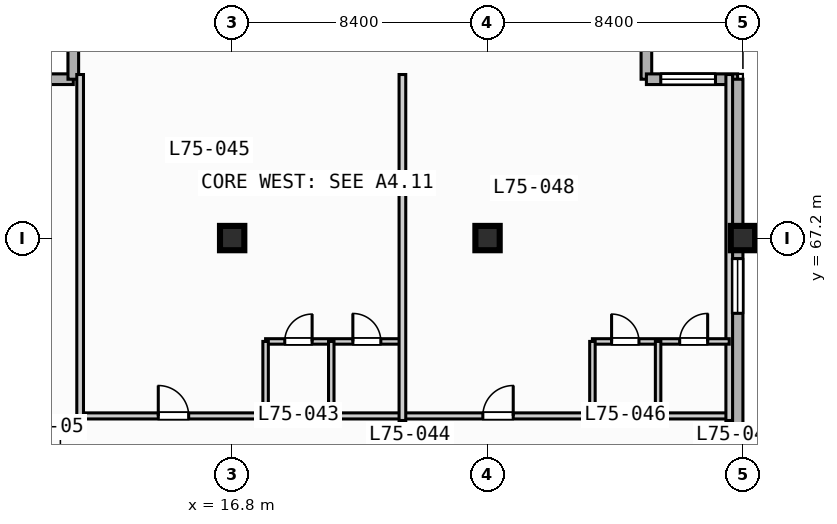
"""IFC4 building model, lengths in metres.
Left out: names, types, materials, properties, quantities, classifications, styles, units other than length and angle.
Written with IfcOpenShell. Run it as: python <this file> out.ifc"""

import sys

from ifc_helpers import new_model, si_unit, direction, frame, frame_2d, origin, origin_2d, place, context, subcontext, project, spatial, rectangle, extrude, element, fill, save


model = new_model("IFC4")
c1 = context("Model", 3, precision=1e-05, world=origin(), true_north=direction((0.0, 1.0)))
c2 = subcontext(c1, "Body", "Model", "MODEL_VIEW")
j1 = project(units=[si_unit("LENGTHUNIT", "METRE"), si_unit("PLANEANGLEUNIT", "RADIAN")], contexts=[c1])
p1 = place(None, origin())
s1 = spatial("IfcSite", under=j1, at=p1, CompositionType="ELEMENT")
p2 = place(p1, origin())
s2 = spatial("IfcBuilding", under=s1, at=p2, CompositionType="ELEMENT")
p3 = place(p2, frame((0.0, 0.0, 304.7)))
s3 = spatial("IfcBuildingStorey", under=s2, at=p3, CompositionType="ELEMENT", Elevation=304.7)
for number, where, z_axis, x_axis in (
    (1, (16.8, 67.2, 0.0), (0.0, 0.0, 1.0), (1.0, 0.0, 0.0)),
    (2, (25.2, 67.2, 0.0), (0.0, 0.0, 1.0), (1.0, 0.0, 0.0)),
    (3, (33.6, 67.2, 0.0), (0.0, 0.0, 1.0), (1.0, 0.0, 0.0)),
):
    element("IfcColumn", number, at=place(p3, frame(where, z_axis=z_axis, x_axis=x_axis)), inside=s3, PredefinedType="COLUMN", context=c2, shape_type="SweptSolid", body=[
        extrude(rectangle(XDim=0.8, YDim=0.8, at=origin_2d()), origin(), (0.0, 0.0, 1.0), 3.9),
    ])
for number, where, z_axis, x_axis in (
    (4, (8.575, 72.425, 0.0), (0.0, 0.0, 1.0), (1.0, 0.0, 0.0)),
    (5, (11.575, 72.425, 0.0), (0.0, 0.0, 1.0), (0.0, 1.0, 0.0)),
    (6, (30.425, 75.425, 0.0), (0.0, 0.0, 1.0), (0.0, -1.0, 0.0)),
):
    element("IfcWall", number, at=place(p3, frame(where, z_axis=z_axis, x_axis=x_axis)), inside=s3, PredefinedType="STANDARD", context=c2, shape_type="SweptSolid", body=[
        extrude(rectangle(XDim=3.0, YDim=0.35, at=frame_2d((1.5, 0.0))), origin(), (0.0, 0.0, 1.0), 3.67),
    ])
p4 = place(p3, frame((30.425, 72.425, 0.0), z_axis=(0.0, 0.0, 1.0), x_axis=(1.0, 0.0, 0.0)))
e7 = element("IfcWall", 7, at=p4, inside=s3, PredefinedType="STANDARD", context=c2, shape_type="SweptSolid", body=[
    extrude(rectangle(XDim=3.0, YDim=0.35, at=frame_2d((1.5, 0.0))), origin(), (0.0, 0.0, 1.0), 3.67),
])
p5 = place(p4, frame((0.472, 0.0, 0.85)))
e8 = element("IfcOpeningElement", 8, at=p5, cuts=e7, PredefinedType="OPENING", context=c2, shape_type="SweptSolid", body=[
    extrude(rectangle(XDim=1.8, YDim=1.8, at=frame_2d((0.9, 0.9))), frame((0.0, 0.185, 0.0), z_axis=(0.0, -1.0, 0.0), x_axis=(1.0, 0.0, 0.0)), (0.0, 0.0, 1.0), 0.37),
])
p6 = place(p3, frame((33.425, 72.425, 0.0), z_axis=(0.0, 0.0, 1.0), x_axis=(0.0, -1.0, 0.0)))
e9 = element("IfcWall", 9, at=p6, inside=s3, PredefinedType="STANDARD", context=c2, shape_type="SweptSolid", body=[
    extrude(rectangle(XDim=39.0, YDim=0.35, at=frame_2d((19.5, 0.0))), origin(), (0.0, 0.0, 1.0), 3.67),
])
p7 = place(p6, frame((5.9, 0.0, 0.85)))
e10 = element("IfcOpeningElement", 10, at=p7, cuts=e9, PredefinedType="OPENING", context=c2, shape_type="SweptSolid", body=[
    extrude(rectangle(XDim=1.8, YDim=1.8, at=frame_2d((0.9, 0.9))), frame((0.0, 0.185, 0.0), z_axis=(0.0, -1.0, 0.0), x_axis=(1.0, 0.0, 0.0)), (0.0, 0.0, 1.0), 0.37),
])
p8 = place(p3, frame((11.8, 61.35, 0.0), z_axis=(0.0, 0.0, 1.0), x_axis=(1.0, 0.0, 0.0)))
e11 = element("IfcWall", 11, at=p8, inside=s3, PredefinedType="PARTITIONING", context=c2, shape_type="SweptSolid", body=[
    extrude(rectangle(XDim=21.35, YDim=0.2, at=frame_2d((10.675, 0.0))), origin(), (0.0, 0.0, 1.0), 3.67),
])
p9 = place(p8, frame((2.57, 0.0, 0.0)))
e12 = element("IfcOpeningElement", 12, at=p9, cuts=e11, PredefinedType="OPENING", context=c2, shape_type="SweptSolid", body=[
    extrude(rectangle(XDim=1.0, YDim=2.15, at=frame_2d((0.5, 1.075))), frame((0.0, 0.11, 0.0), z_axis=(0.0, -1.0, 0.0), x_axis=(1.0, 0.0, 0.0)), (0.0, 0.0, 1.0), 0.22),
])
p10 = place(p8, frame((13.245, 0.0, 0.0)))
e13 = element("IfcOpeningElement", 13, at=p10, cuts=e11, PredefinedType="OPENING", context=c2, shape_type="SweptSolid", body=[
    extrude(rectangle(XDim=1.0, YDim=2.15, at=frame_2d((0.5, 1.075))), frame((0.0, 0.11, 0.0), z_axis=(0.0, -1.0, 0.0), x_axis=(1.0, 0.0, 0.0)), (0.0, 0.0, 1.0), 0.22),
])
p11 = place(p3, frame((11.8, 61.2, 0.0), z_axis=(0.0, 0.0, 1.0), x_axis=(0.0, 1.0, 0.0)))
e14 = element("IfcWall", 14, at=p11, inside=s3, PredefinedType="PARTITIONING", context=c2, shape_type="SweptSolid", body=[
    extrude(rectangle(XDim=11.38, YDim=0.22, at=frame_2d((5.69, 0.0))), origin(), (0.0, 0.0, 1.0), 3.67),
])
p12 = place(p3, frame((17.9, 63.8, 0.0), z_axis=(0.0, 0.0, 1.0), x_axis=(1.0, 0.0, 0.0)))
e15 = element("IfcWall", 15, at=p12, inside=s3, PredefinedType="PLUMBINGWALL", context=c2, shape_type="SweptSolid", body=[
    extrude(rectangle(XDim=4.5, YDim=0.18, at=frame_2d((2.25, 0.0))), origin(), (0.0, 0.0, 1.0), 3.67),
])
p13 = place(p12, frame((0.63, 0.0, 0.0)))
e16 = element("IfcOpeningElement", 16, at=p13, cuts=e15, PredefinedType="OPENING", context=c2, shape_type="SweptSolid", body=[
    extrude(rectangle(XDim=0.9, YDim=2.1, at=frame_2d((0.45, 1.05))), frame((0.0, 0.1, 0.0), z_axis=(0.0, -1.0, 0.0), x_axis=(1.0, 0.0, 0.0)), (0.0, 0.0, 1.0), 0.2),
])
p14 = place(p12, frame((2.87, 0.0, 0.0)))
e17 = element("IfcOpeningElement", 17, at=p14, cuts=e15, PredefinedType="OPENING", context=c2, shape_type="SweptSolid", body=[
    extrude(rectangle(XDim=0.92, YDim=2.1, at=frame_2d((0.46, 1.05))), frame((0.0, 0.1, 0.0), z_axis=(0.0, -1.0, 0.0), x_axis=(1.0, 0.0, 0.0)), (0.0, 0.0, 1.0), 0.2),
])
for number, where, z_axis, x_axis in (
    (18, (17.9, 61.35, 0.0), (0.0, 0.0, 1.0), (0.0, 1.0, 0.0)),
    (19, (20.06, 61.35, 0.0), (0.0, 0.0, 1.0), (0.0, 1.0, 0.0)),
):
    element("IfcWall", number, at=place(p3, frame(where, z_axis=z_axis, x_axis=x_axis)), inside=s3, PredefinedType="PLUMBINGWALL", context=c2, shape_type="SweptSolid", body=[
        extrude(rectangle(XDim=2.45, YDim=0.18, at=frame_2d((1.225, 0.0))), origin(), (0.0, 0.0, 1.0), 3.67),
    ])
for number, where, z_axis, x_axis in (
    (20, (22.4, 61.2, 0.0), (0.0, 0.0, 1.0), (0.0, 1.0, 0.0)),
    (21, (33.15, 61.2, 0.0), (0.0, 0.0, 1.0), (0.0, 1.0, 0.0)),
):
    element("IfcWall", number, at=place(p3, frame(where, z_axis=z_axis, x_axis=x_axis)), inside=s3, PredefinedType="PARTITIONING", context=c2, shape_type="SweptSolid", body=[
        extrude(rectangle(XDim=11.38, YDim=0.22, at=frame_2d((5.69, 0.0))), origin(), (0.0, 0.0, 1.0), 3.67),
    ])
p15 = place(p3, frame((28.65, 63.8, 0.0), z_axis=(0.0, 0.0, 1.0), x_axis=(1.0, 0.0, 0.0)))
e22 = element("IfcWall", 22, at=p15, inside=s3, PredefinedType="PLUMBINGWALL", context=c2, shape_type="SweptSolid", body=[
    extrude(rectangle(XDim=4.5, YDim=0.18, at=frame_2d((2.25, 0.0))), origin(), (0.0, 0.0, 1.0), 3.67),
])
p16 = place(p15, frame((0.63, 0.0, 0.0)))
e23 = element("IfcOpeningElement", 23, at=p16, cuts=e22, PredefinedType="OPENING", context=c2, shape_type="SweptSolid", body=[
    extrude(rectangle(XDim=0.9, YDim=2.1, at=frame_2d((0.45, 1.05))), frame((0.0, 0.1, 0.0), z_axis=(0.0, -1.0, 0.0), x_axis=(1.0, 0.0, 0.0)), (0.0, 0.0, 1.0), 0.2),
])
p17 = place(p15, frame((2.87, 0.0, 0.0)))
e24 = element("IfcOpeningElement", 24, at=p17, cuts=e22, PredefinedType="OPENING", context=c2, shape_type="SweptSolid", body=[
    extrude(rectangle(XDim=0.92, YDim=2.1, at=frame_2d((0.46, 1.05))), frame((0.0, 0.1, 0.0), z_axis=(0.0, -1.0, 0.0), x_axis=(1.0, 0.0, 0.0)), (0.0, 0.0, 1.0), 0.2),
])
for number, where, z_axis, x_axis in (
    (25, (28.65, 61.35, 0.0), (0.0, 0.0, 1.0), (0.0, 1.0, 0.0)),
    (26, (30.81, 61.35, 0.0), (0.0, 0.0, 1.0), (0.0, 1.0, 0.0)),
):
    element("IfcWall", number, at=place(p3, frame(where, z_axis=z_axis, x_axis=x_axis)), inside=s3, PredefinedType="PLUMBINGWALL", context=c2, shape_type="SweptSolid", body=[
        extrude(rectangle(XDim=2.45, YDim=0.18, at=frame_2d((1.225, 0.0))), origin(), (0.0, 0.0, 1.0), 3.67),
    ])
p18 = place(p5, origin())
e27 = element("IfcWindow", 27, at=p18, inside=s3, PartitioningType="SINGLE_PANEL", PredefinedType="WINDOW", context=c2, shape_type="SweptSolid", body=[
    extrude(rectangle(XDim=1.8, YDim=1.8, at=frame_2d((0.9, 0.9))), frame((0.0, 0.03, 0.0), z_axis=(0.0, -1.0, 0.0), x_axis=(1.0, 0.0, 0.0)), (0.0, 0.0, 1.0), 0.06),
])
fill(e8, e27)
p19 = place(p7, origin())
e28 = element("IfcWindow", 28, at=p19, inside=s3, PartitioningType="SINGLE_PANEL", PredefinedType="WINDOW", context=c2, shape_type="SweptSolid", body=[
    extrude(rectangle(XDim=1.8, YDim=1.8, at=frame_2d((0.9, 0.9))), frame((0.0, 0.03, 0.0), z_axis=(0.0, -1.0, 0.0), x_axis=(1.0, 0.0, 0.0)), (0.0, 0.0, 1.0), 0.06),
])
fill(e10, e28)
p20 = place(p9, origin())
e29 = element("IfcDoor", 29, at=p20, inside=s3, OperationType="SINGLE_SWING_LEFT", PredefinedType="DOOR", context=c2, shape_type="SweptSolid", body=[
    extrude(rectangle(XDim=1.0, YDim=2.15, at=frame_2d((0.5, 1.075))), frame((0.0, 0.025, 0.0), z_axis=(0.0, -1.0, 0.0), x_axis=(1.0, 0.0, 0.0)), (0.0, 0.0, 1.0), 0.05),
])
fill(e12, e29)
p21 = place(p10, origin())
e30 = element("IfcDoor", 30, at=p21, inside=s3, OperationType="SINGLE_SWING_RIGHT", PredefinedType="DOOR", context=c2, shape_type="SweptSolid", body=[
    extrude(rectangle(XDim=1.0, YDim=2.15, at=frame_2d((0.5, 1.075))), frame((0.0, 0.025, 0.0), z_axis=(0.0, -1.0, 0.0), x_axis=(1.0, 0.0, 0.0)), (0.0, 0.0, 1.0), 0.05),
])
fill(e13, e30)
p22 = place(p13, origin())
e31 = element("IfcDoor", 31, at=p22, inside=s3, OperationType="SINGLE_SWING_RIGHT", PredefinedType="DOOR", context=c2, shape_type="SweptSolid", body=[
    extrude(rectangle(XDim=0.9, YDim=2.1, at=frame_2d((0.45, 1.05))), frame((0.0, 0.025, 0.0), z_axis=(0.0, -1.0, 0.0), x_axis=(1.0, 0.0, 0.0)), (0.0, 0.0, 1.0), 0.05),
])
fill(e16, e31)
p23 = place(p14, origin())
e32 = element("IfcDoor", 32, at=p23, inside=s3, OperationType="SINGLE_SWING_LEFT", PredefinedType="DOOR", context=c2, shape_type="SweptSolid", body=[
    extrude(rectangle(XDim=0.92, YDim=2.1, at=frame_2d((0.46, 1.05))), frame((0.0, 0.025, 0.0), z_axis=(0.0, -1.0, 0.0), x_axis=(1.0, 0.0, 0.0)), (0.0, 0.0, 1.0), 0.05),
])
fill(e17, e32)
p24 = place(p16, origin())
e33 = element("IfcDoor", 33, at=p24, inside=s3, OperationType="SINGLE_SWING_LEFT", PredefinedType="DOOR", context=c2, shape_type="SweptSolid", body=[
    extrude(rectangle(XDim=0.9, YDim=2.1, at=frame_2d((0.45, 1.05))), frame((0.0, 0.025, 0.0), z_axis=(0.0, -1.0, 0.0), x_axis=(1.0, 0.0, 0.0)), (0.0, 0.0, 1.0), 0.05),
])
fill(e23, e33)
p25 = place(p17, origin())
e34 = element("IfcDoor", 34, at=p25, inside=s3, OperationType="SINGLE_SWING_RIGHT", PredefinedType="DOOR", context=c2, shape_type="SweptSolid", body=[
    extrude(rectangle(XDim=0.92, YDim=2.1, at=frame_2d((0.46, 1.05))), frame((0.0, 0.025, 0.0), z_axis=(0.0, -1.0, 0.0), x_axis=(1.0, 0.0, 0.0)), (0.0, 0.0, 1.0), 0.05),
])
fill(e24, e34)
save(model, sys.argv[1])
